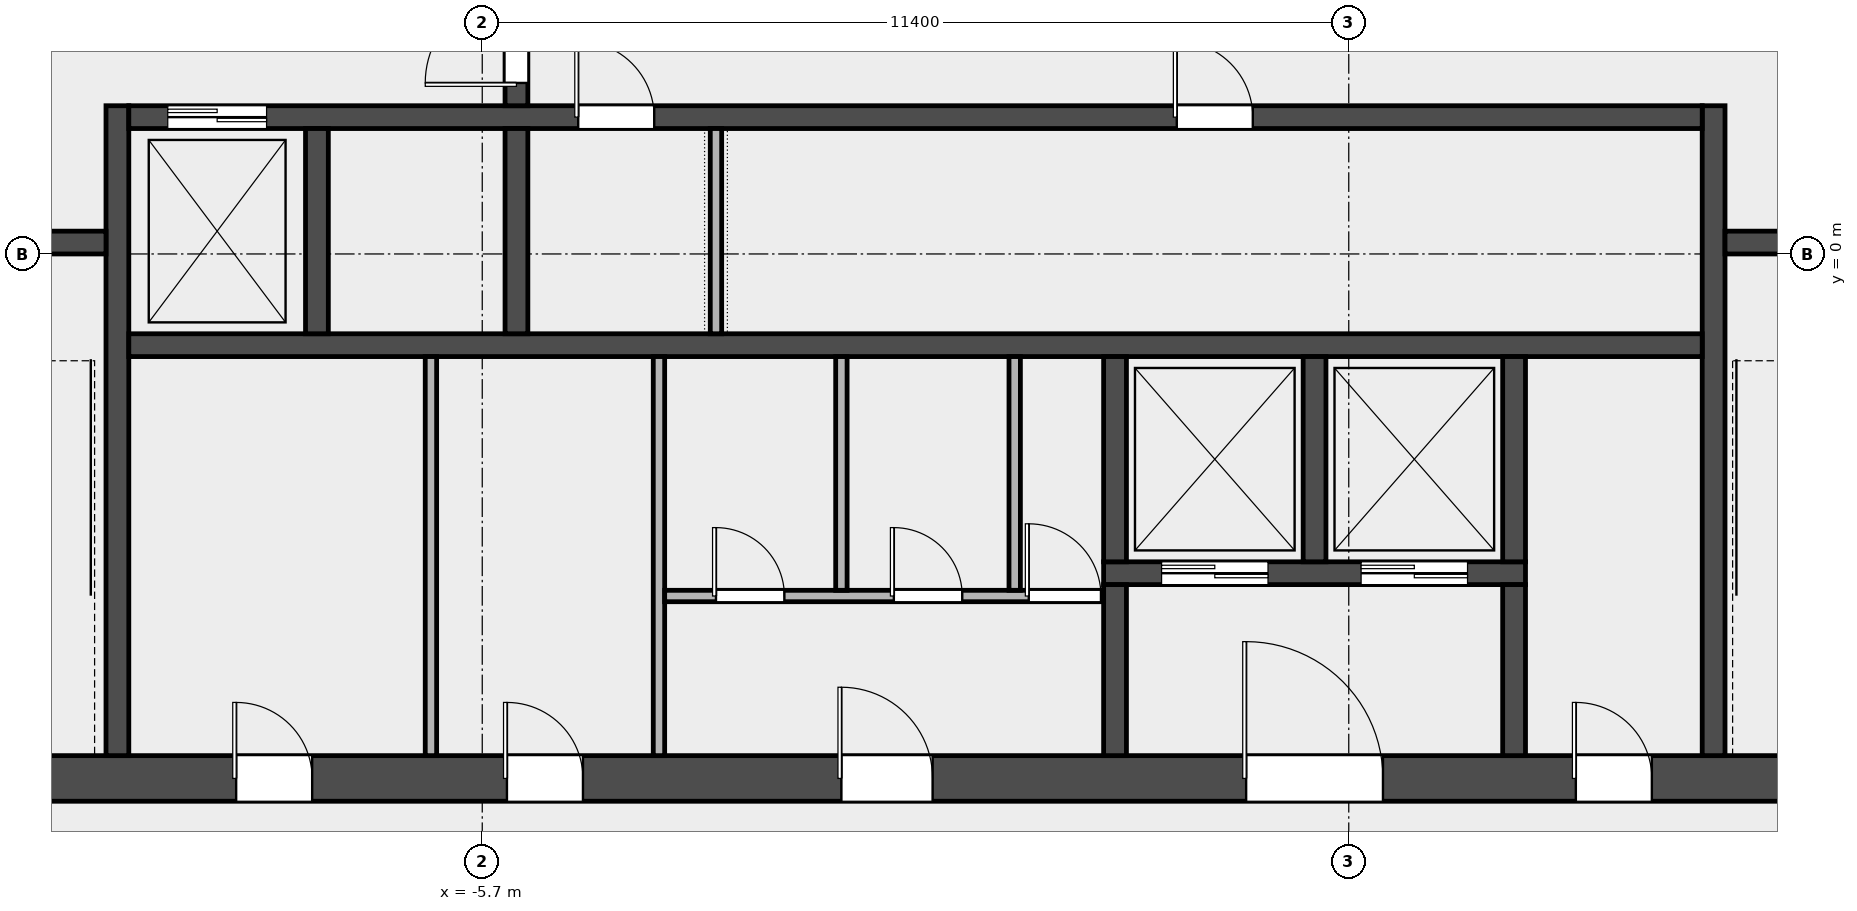
"""IFC4 building model, lengths in metres.
Left out: names, types, materials, properties, quantities, classifications, styles, units other than length and angle.
Written with IfcOpenShell. Run it as: python <this file> out.ifc"""

import sys

from ifc_helpers import new_model, si_unit, direction, frame, frame_2d, origin, place, context, subcontext, project, spatial, rectangle, extrude, element, fill, save


model = new_model("IFC4")
c1 = context("Model", 3, precision=1e-05, world=origin(), true_north=direction((0.0, 1.0)))
c2 = subcontext(c1, "Body", "Model", "MODEL_VIEW")
j1 = project(units=[si_unit("LENGTHUNIT", "METRE"), si_unit("PLANEANGLEUNIT", "RADIAN")], contexts=[c1])
p1 = place(None, origin())
s1 = spatial("IfcSite", under=j1, at=p1, CompositionType="ELEMENT")
p2 = place(p1, origin())
s2 = spatial("IfcBuilding", under=s1, at=p2, CompositionType="ELEMENT")
p3 = place(p2, frame((0.0, 0.0, 325.4)))
s3 = spatial("IfcBuildingStorey", under=s2, at=p3, CompositionType="ELEMENT", Elevation=325.4)
p4 = place(p3, frame((-14.4, -6.9, 0.0), z_axis=(0.0, 0.0, 1.0), x_axis=(1.0, 0.0, 0.0)))
e1 = element("IfcWall", 1, at=p4, inside=s3, PredefinedType="SHEAR", context=c2, shape_type="SweptSolid", body=[
    extrude(rectangle(XDim=28.8, YDim=0.6, at=frame_2d((14.4, 0.0))), origin(), (0.0, 0.0, 1.0), 3.7),
])
p5 = place(p4, frame((5.462, 0.0, 0.0)))
e2 = element("IfcOpeningElement", 2, at=p5, cuts=e1, PredefinedType="OPENING", context=c2, shape_type="SweptSolid", body=[
    extrude(rectangle(XDim=1.0, YDim=2.1, at=frame_2d((0.5, 1.05))), frame((0.0, 0.312, 0.0), z_axis=(0.0, -1.0, 0.0), x_axis=(1.0, 0.0, 0.0)), (0.0, 0.0, 1.0), 0.624),
])
p6 = place(p4, frame((9.025, 0.0, 0.0)))
e3 = element("IfcOpeningElement", 3, at=p6, cuts=e1, PredefinedType="OPENING", context=c2, shape_type="SweptSolid", body=[
    extrude(rectangle(XDim=1.0, YDim=2.1, at=frame_2d((0.5, 1.05))), frame((0.0, 0.312, 0.0), z_axis=(0.0, -1.0, 0.0), x_axis=(1.0, 0.0, 0.0)), (0.0, 0.0, 1.0), 0.624),
])
p7 = place(p4, frame((13.425, 0.0, 0.0)))
e4 = element("IfcOpeningElement", 4, at=p7, cuts=e1, PredefinedType="OPENING", context=c2, shape_type="SweptSolid", body=[
    extrude(rectangle(XDim=1.2, YDim=2.1, at=frame_2d((0.6, 1.05))), frame((0.0, 0.312, 0.0), z_axis=(0.0, -1.0, 0.0), x_axis=(1.0, 0.0, 0.0)), (0.0, 0.0, 1.0), 0.624),
])
p8 = place(p4, frame((18.75, 0.0, 0.0)))
e5 = element("IfcOpeningElement", 5, at=p8, cuts=e1, PredefinedType="OPENING", context=c2, shape_type="SweptSolid", body=[
    extrude(rectangle(XDim=1.8, YDim=2.1, at=frame_2d((0.9, 1.05))), frame((0.0, 0.312, 0.0), z_axis=(0.0, -1.0, 0.0), x_axis=(1.0, 0.0, 0.0)), (0.0, 0.0, 1.0), 0.624),
])
p9 = place(p4, frame((23.087, 0.0, 0.0)))
e6 = element("IfcOpeningElement", 6, at=p9, cuts=e1, PredefinedType="OPENING", context=c2, shape_type="SweptSolid", body=[
    extrude(rectangle(XDim=1.0, YDim=2.1, at=frame_2d((0.5, 1.05))), frame((0.0, 0.312, 0.0), z_axis=(0.0, -1.0, 0.0), x_axis=(1.0, 0.0, 0.0)), (0.0, 0.0, 1.0), 0.624),
])
for number, where, z_axis, x_axis in (
    (7, (-10.5, -6.6, 0.0), (0.0, 0.0, 1.0), (0.0, 1.0, 0.0)),
    (8, (10.5, -6.6, 0.0), (0.0, 0.0, 1.0), (0.0, 1.0, 0.0)),
):
    element("IfcWall", number, at=place(p3, frame(where, z_axis=z_axis, x_axis=x_axis)), inside=s3, PredefinedType="SHEAR", context=c2, shape_type="SweptSolid", body=[
        extrude(rectangle(XDim=8.55, YDim=0.3, at=frame_2d((4.275, 0.0))), origin(), (0.0, 0.0, 1.0), 3.7),
    ])
p10 = place(p3, frame((-13.8, 0.15, 0.0), z_axis=(0.0, 0.0, 1.0), x_axis=(1.0, 0.0, 0.0)))
e9 = element("IfcWall", 9, at=p10, inside=s3, PredefinedType="SOLIDWALL", context=c2, shape_type="SweptSolid", body=[
    extrude(rectangle(XDim=3.15, YDim=0.3, at=frame_2d((1.575, 0.0))), origin(), (0.0, 0.0, 1.0), 3.7),
])
p11 = place(p10, frame((0.975, 0.0, 0.0)))
e10 = element("IfcOpeningElement", 10, at=p11, cuts=e9, PredefinedType="OPENING", context=c2, shape_type="SweptSolid", body=[
    extrude(rectangle(XDim=1.1, YDim=2.1, at=frame_2d((0.55, 1.05))), frame((0.0, 0.162, 0.0), z_axis=(0.0, -1.0, 0.0), x_axis=(1.0, 0.0, 0.0)), (0.0, 0.0, 1.0), 0.324),
])
p12 = place(p3, frame((10.65, 0.15, 0.0), z_axis=(0.0, 0.0, 1.0), x_axis=(1.0, 0.0, 0.0)))
e11 = element("IfcWall", 11, at=p12, inside=s3, PredefinedType="SOLIDWALL", context=c2, shape_type="SweptSolid", body=[
    extrude(rectangle(XDim=3.15, YDim=0.3, at=frame_2d((1.575, 0.0))), origin(), (0.0, 0.0, 1.0), 3.7),
])
p13 = place(p12, frame((1.025, 0.0, 0.0)))
e12 = element("IfcOpeningElement", 12, at=p13, cuts=e11, PredefinedType="OPENING", context=c2, shape_type="SweptSolid", body=[
    extrude(rectangle(XDim=1.1, YDim=2.1, at=frame_2d((0.55, 1.05))), frame((0.0, 0.162, 0.0), z_axis=(0.0, -1.0, 0.0), x_axis=(1.0, 0.0, 0.0)), (0.0, 0.0, 1.0), 0.324),
])
p14 = place(p3, frame((-10.35, -1.2, 0.0), z_axis=(0.0, 0.0, 1.0), x_axis=(1.0, 0.0, 0.0)))
e13 = element("IfcWall", 13, at=p14, inside=s3, PredefinedType="SOLIDWALL", context=c2, shape_type="SweptSolid", body=[
    extrude(rectangle(XDim=20.7, YDim=0.3, at=frame_2d((10.35, 0.0))), origin(), (0.0, 0.0, 1.0), 3.7),
])
p15 = place(p3, frame((-10.35, 1.8, 0.0), z_axis=(0.0, 0.0, 1.0), x_axis=(1.0, 0.0, 0.0)))
e14 = element("IfcWall", 14, at=p15, inside=s3, PredefinedType="SOLIDWALL", context=c2, shape_type="SweptSolid", body=[
    extrude(rectangle(XDim=20.7, YDim=0.3, at=frame_2d((10.35, 0.0))), origin(), (0.0, 0.0, 1.0), 3.7),
])
p16 = place(p15, frame((0.512, 0.0, 0.0)))
e15 = element("IfcOpeningElement", 15, at=p16, cuts=e14, PredefinedType="OPENING", context=c2, shape_type="SweptSolid", body=[
    extrude(rectangle(XDim=1.3, YDim=2.1, at=frame_2d((0.65, 1.05))), frame((0.0, 0.162, 0.0), z_axis=(0.0, -1.0, 0.0), x_axis=(1.0, 0.0, 0.0)), (0.0, 0.0, 1.0), 0.324),
])
p17 = place(p15, frame((5.913, 0.0, 0.0)))
e16 = element("IfcOpeningElement", 16, at=p17, cuts=e14, PredefinedType="OPENING", context=c2, shape_type="SweptSolid", body=[
    extrude(rectangle(XDim=1.0, YDim=2.1, at=frame_2d((0.5, 1.05))), frame((0.0, 0.162, 0.0), z_axis=(0.0, -1.0, 0.0), x_axis=(1.0, 0.0, 0.0)), (0.0, 0.0, 1.0), 0.324),
])
p18 = place(p15, frame((13.788, 0.0, 0.0)))
e17 = element("IfcOpeningElement", 17, at=p18, cuts=e14, PredefinedType="OPENING", context=c2, shape_type="SweptSolid", body=[
    extrude(rectangle(XDim=1.0, YDim=2.1, at=frame_2d((0.5, 1.05))), frame((0.0, 0.162, 0.0), z_axis=(0.0, -1.0, 0.0), x_axis=(1.0, 0.0, 0.0)), (0.0, 0.0, 1.0), 0.324),
])
for number, where, z_axis, x_axis in (
    (18, (-7.875, -1.05, 0.0), (0.0, 0.0, 1.0), (0.0, 1.0, 0.0)),
    (19, (-5.25, -1.05, 0.0), (0.0, 0.0, 1.0), (0.0, 1.0, 0.0)),
):
    element("IfcWall", number, at=place(p3, frame(where, z_axis=z_axis, x_axis=x_axis)), inside=s3, PredefinedType="SOLIDWALL", context=c2, shape_type="SweptSolid", body=[
        extrude(rectangle(XDim=2.7, YDim=0.3, at=frame_2d((1.35, 0.0))), origin(), (0.0, 0.0, 1.0), 3.7),
    ])
p19 = place(p3, frame((-5.25, 1.95, 0.0), z_axis=(0.0, 0.0, 1.0), x_axis=(0.0, 1.0, 0.0)))
e20 = element("IfcWall", 20, at=p19, inside=s3, PredefinedType="SOLIDWALL", context=c2, shape_type="SweptSolid", body=[
    extrude(rectangle(XDim=3.3, YDim=0.3, at=frame_2d((1.65, 0.0))), origin(), (0.0, 0.0, 1.0), 3.7),
])
p20 = place(p19, frame((0.3, 0.0, 0.0)))
e21 = element("IfcOpeningElement", 21, at=p20, cuts=e20, PredefinedType="OPENING", context=c2, shape_type="SweptSolid", body=[
    extrude(rectangle(XDim=1.2, YDim=2.1, at=frame_2d((0.6, 1.05))), frame((0.0, 0.162, 0.0), z_axis=(0.0, -1.0, 0.0), x_axis=(1.0, 0.0, 0.0)), (0.0, 0.0, 1.0), 0.324),
])
p21 = place(p19, frame((1.8, 0.0, 0.0)))
e22 = element("IfcOpeningElement", 22, at=p21, cuts=e20, PredefinedType="OPENING", context=c2, shape_type="SweptSolid", body=[
    extrude(rectangle(XDim=1.2, YDim=2.1, at=frame_2d((0.6, 1.05))), frame((0.0, 0.162, 0.0), z_axis=(0.0, -1.0, 0.0), x_axis=(1.0, 0.0, 0.0)), (0.0, 0.0, 1.0), 0.324),
])
p22 = place(p3, frame((2.475, -4.2, 0.0), z_axis=(0.0, 0.0, 1.0), x_axis=(1.0, 0.0, 0.0)))
e23 = element("IfcWall", 23, at=p22, inside=s3, PredefinedType="SOLIDWALL", context=c2, shape_type="SweptSolid", body=[
    extrude(rectangle(XDim=5.55, YDim=0.3, at=frame_2d((2.775, 0.0))), origin(), (0.0, 0.0, 1.0), 3.7),
])
p23 = place(p22, frame((0.762, 0.0, 0.0)))
e24 = element("IfcOpeningElement", 24, at=p23, cuts=e23, PredefinedType="OPENING", context=c2, shape_type="SweptSolid", body=[
    extrude(rectangle(XDim=1.4, YDim=2.1, at=frame_2d((0.7, 1.05))), frame((0.0, 0.162, 0.0), z_axis=(0.0, -1.0, 0.0), x_axis=(1.0, 0.0, 0.0)), (0.0, 0.0, 1.0), 0.324),
])
p24 = place(p22, frame((3.387, 0.0, 0.0)))
e25 = element("IfcOpeningElement", 25, at=p24, cuts=e23, PredefinedType="OPENING", context=c2, shape_type="SweptSolid", body=[
    extrude(rectangle(XDim=1.4, YDim=2.1, at=frame_2d((0.7, 1.05))), frame((0.0, 0.162, 0.0), z_axis=(0.0, -1.0, 0.0), x_axis=(1.0, 0.0, 0.0)), (0.0, 0.0, 1.0), 0.324),
])
p25 = place(p3, frame((2.625, -4.05, 0.0), z_axis=(0.0, 0.0, 1.0), x_axis=(0.0, 1.0, 0.0)))
e26 = element("IfcWall", 26, at=p25, inside=s3, PredefinedType="SOLIDWALL", context=c2, shape_type="SweptSolid", body=[
    extrude(rectangle(XDim=2.7, YDim=0.3, at=frame_2d((1.35, 0.0))), origin(), (0.0, 0.0, 1.0), 3.7),
])
p26 = place(p3, frame((2.625, -6.6, 0.0), z_axis=(0.0, 0.0, 1.0), x_axis=(0.0, 1.0, 0.0)))
e27 = element("IfcWall", 27, at=p26, inside=s3, PredefinedType="SOLIDWALL", context=c2, shape_type="SweptSolid", body=[
    extrude(rectangle(XDim=2.25, YDim=0.3, at=frame_2d((1.125, 0.0))), origin(), (0.0, 0.0, 1.0), 3.7),
])
for number, where, z_axis, x_axis in (
    (28, (5.25, -4.05, 0.0), (0.0, 0.0, 1.0), (0.0, 1.0, 0.0)),
    (29, (7.875, -4.05, 0.0), (0.0, 0.0, 1.0), (0.0, 1.0, 0.0)),
):
    element("IfcWall", number, at=place(p3, frame(where, z_axis=z_axis, x_axis=x_axis)), inside=s3, PredefinedType="SOLIDWALL", context=c2, shape_type="SweptSolid", body=[
        extrude(rectangle(XDim=2.7, YDim=0.3, at=frame_2d((1.35, 0.0))), origin(), (0.0, 0.0, 1.0), 3.7),
    ])
p27 = place(p3, frame((7.875, -6.6, 0.0), z_axis=(0.0, 0.0, 1.0), x_axis=(0.0, 1.0, 0.0)))
e30 = element("IfcWall", 30, at=p27, inside=s3, PredefinedType="SOLIDWALL", context=c2, shape_type="SweptSolid", body=[
    extrude(rectangle(XDim=2.25, YDim=0.3, at=frame_2d((1.125, 0.0))), origin(), (0.0, 0.0, 1.0), 3.7),
])
for number, where, z_axis, x_axis in (
    (31, (-6.375, -6.6, 0.0), (0.0, 0.0, 1.0), (0.0, 1.0, 0.0)),
    (32, (-3.375, -6.6, 0.0), (0.0, 0.0, 1.0), (0.0, 1.0, 0.0)),
):
    element("IfcWall", number, at=place(p3, frame(where, z_axis=z_axis, x_axis=x_axis)), inside=s3, PredefinedType="PARTITIONING", context=c2, shape_type="SweptSolid", body=[
        extrude(rectangle(XDim=5.25, YDim=0.15, at=frame_2d((2.625, 0.0))), origin(), (0.0, 0.0, 1.0), 3.7),
    ])
p28 = place(p3, frame((-3.3, -4.5, 0.0), z_axis=(0.0, 0.0, 1.0), x_axis=(1.0, 0.0, 0.0)))
e33 = element("IfcWall", 33, at=p28, inside=s3, PredefinedType="PARTITIONING", context=c2, shape_type="SweptSolid", body=[
    extrude(rectangle(XDim=5.775, YDim=0.15, at=frame_2d((2.888, 0.0))), origin(), (0.0, 0.0, 1.0), 3.7),
])
p29 = place(p28, frame((0.675, 0.0, 0.0)))
e34 = element("IfcOpeningElement", 34, at=p29, cuts=e33, PredefinedType="OPENING", context=c2, shape_type="SweptSolid", body=[
    extrude(rectangle(XDim=0.9, YDim=2.1, at=frame_2d((0.45, 1.05))), frame((0.0, 0.087, 0.0), z_axis=(0.0, -1.0, 0.0), x_axis=(1.0, 0.0, 0.0)), (0.0, 0.0, 1.0), 0.174),
])
p30 = place(p28, frame((3.015, 0.0, 0.0)))
e35 = element("IfcOpeningElement", 35, at=p30, cuts=e33, PredefinedType="OPENING", context=c2, shape_type="SweptSolid", body=[
    extrude(rectangle(XDim=0.9, YDim=2.1, at=frame_2d((0.45, 1.05))), frame((0.0, 0.087, 0.0), z_axis=(0.0, -1.0, 0.0), x_axis=(1.0, 0.0, 0.0)), (0.0, 0.0, 1.0), 0.174),
])
p31 = place(p28, frame((4.79, 0.0, 0.0)))
e36 = element("IfcOpeningElement", 36, at=p31, cuts=e33, PredefinedType="OPENING", context=c2, shape_type="SweptSolid", body=[
    extrude(rectangle(XDim=0.95, YDim=2.1, at=frame_2d((0.475, 1.05))), frame((0.0, 0.087, 0.0), z_axis=(0.0, -1.0, 0.0), x_axis=(1.0, 0.0, 0.0)), (0.0, 0.0, 1.0), 0.174),
])
for number, where, z_axis, x_axis in (
    (37, (-0.975, -4.425, 0.0), (0.0, 0.0, 1.0), (0.0, 1.0, 0.0)),
    (38, (1.305, -4.425, 0.0), (0.0, 0.0, 1.0), (0.0, 1.0, 0.0)),
):
    element("IfcWall", number, at=place(p3, frame(where, z_axis=z_axis, x_axis=x_axis)), inside=s3, PredefinedType="PARTITIONING", context=c2, shape_type="SweptSolid", body=[
        extrude(rectangle(XDim=3.075, YDim=0.15, at=frame_2d((1.538, 0.0))), origin(), (0.0, 0.0, 1.0), 3.7),
    ])
p32 = place(p3, frame((-2.625, -1.05, 0.0), z_axis=(0.0, 0.0, 1.0), x_axis=(0.0, 1.0, 0.0)))
e39 = element("IfcWall", 39, at=p32, inside=s3, PredefinedType="PARTITIONING", context=c2, shape_type="SweptSolid", body=[
    extrude(rectangle(XDim=2.7, YDim=0.15, at=frame_2d((1.35, 0.0))), origin(), (0.0, 0.0, 1.0), 3.7),
])
p33 = place(p20, origin())
e40 = element("IfcDoor", 40, at=p33, inside=s3, OperationType="SINGLE_SWING_LEFT", PredefinedType="DOOR", context=c2, shape_type="SweptSolid", body=[
    extrude(rectangle(XDim=1.2, YDim=2.1, at=frame_2d((0.6, 1.05))), frame((0.0, 0.025, 0.0), z_axis=(0.0, -1.0, 0.0), x_axis=(1.0, 0.0, 0.0)), (0.0, 0.0, 1.0), 0.05),
])
fill(e21, e40)
p34 = place(p16, origin())
e41 = element("IfcDoor", 41, at=p34, inside=s3, OperationType="DOUBLE_DOOR_SLIDING", PredefinedType="DOOR", context=c2, shape_type="SweptSolid", body=[
    extrude(rectangle(XDim=1.3, YDim=2.1, at=frame_2d((0.65, 1.05))), frame((0.0, 0.025, 0.0), z_axis=(0.0, -1.0, 0.0), x_axis=(1.0, 0.0, 0.0)), (0.0, 0.0, 1.0), 0.05),
])
fill(e15, e41)
p35 = place(p23, origin())
e42 = element("IfcDoor", 42, at=p35, inside=s3, OperationType="DOUBLE_DOOR_SLIDING", PredefinedType="DOOR", context=c2, shape_type="SweptSolid", body=[
    extrude(rectangle(XDim=1.4, YDim=2.1, at=frame_2d((0.7, 1.05))), frame((0.0, 0.025, 0.0), z_axis=(0.0, -1.0, 0.0), x_axis=(1.0, 0.0, 0.0)), (0.0, 0.0, 1.0), 0.05),
])
fill(e24, e42)
p36 = place(p24, origin())
e43 = element("IfcDoor", 43, at=p36, inside=s3, OperationType="DOUBLE_DOOR_SLIDING", PredefinedType="DOOR", context=c2, shape_type="SweptSolid", body=[
    extrude(rectangle(XDim=1.4, YDim=2.1, at=frame_2d((0.7, 1.05))), frame((0.0, 0.025, 0.0), z_axis=(0.0, -1.0, 0.0), x_axis=(1.0, 0.0, 0.0)), (0.0, 0.0, 1.0), 0.05),
])
fill(e25, e43)
p37 = place(p5, origin())
e44 = element("IfcDoor", 44, at=p37, inside=s3, OperationType="SINGLE_SWING_LEFT", PredefinedType="DOOR", context=c2, shape_type="SweptSolid", body=[
    extrude(rectangle(XDim=1.0, YDim=2.1, at=frame_2d((0.5, 1.05))), frame((0.0, 0.025, 0.0), z_axis=(0.0, -1.0, 0.0), x_axis=(1.0, 0.0, 0.0)), (0.0, 0.0, 1.0), 0.05),
])
fill(e2, e44)
p38 = place(p6, origin())
e45 = element("IfcDoor", 45, at=p38, inside=s3, OperationType="SINGLE_SWING_LEFT", PredefinedType="DOOR", context=c2, shape_type="SweptSolid", body=[
    extrude(rectangle(XDim=1.0, YDim=2.1, at=frame_2d((0.5, 1.05))), frame((0.0, 0.025, 0.0), z_axis=(0.0, -1.0, 0.0), x_axis=(1.0, 0.0, 0.0)), (0.0, 0.0, 1.0), 0.05),
])
fill(e3, e45)
p39 = place(p7, origin())
e46 = element("IfcDoor", 46, at=p39, inside=s3, OperationType="SINGLE_SWING_LEFT", PredefinedType="DOOR", context=c2, shape_type="SweptSolid", body=[
    extrude(rectangle(XDim=1.2, YDim=2.1, at=frame_2d((0.6, 1.05))), frame((0.0, 0.025, 0.0), z_axis=(0.0, -1.0, 0.0), x_axis=(1.0, 0.0, 0.0)), (0.0, 0.0, 1.0), 0.05),
])
fill(e4, e46)
p40 = place(p29, origin())
e47 = element("IfcDoor", 47, at=p40, inside=s3, OperationType="SINGLE_SWING_LEFT", PredefinedType="DOOR", context=c2, shape_type="SweptSolid", body=[
    extrude(rectangle(XDim=0.9, YDim=2.1, at=frame_2d((0.45, 1.05))), frame((0.0, 0.025, 0.0), z_axis=(0.0, -1.0, 0.0), x_axis=(1.0, 0.0, 0.0)), (0.0, 0.0, 1.0), 0.05),
])
fill(e34, e47)
p41 = place(p30, origin())
e48 = element("IfcDoor", 48, at=p41, inside=s3, OperationType="SINGLE_SWING_LEFT", PredefinedType="DOOR", context=c2, shape_type="SweptSolid", body=[
    extrude(rectangle(XDim=0.9, YDim=2.1, at=frame_2d((0.45, 1.05))), frame((0.0, 0.025, 0.0), z_axis=(0.0, -1.0, 0.0), x_axis=(1.0, 0.0, 0.0)), (0.0, 0.0, 1.0), 0.05),
])
fill(e35, e48)
p42 = place(p31, origin())
e49 = element("IfcDoor", 49, at=p42, inside=s3, OperationType="SINGLE_SWING_LEFT", PredefinedType="DOOR", context=c2, shape_type="SweptSolid", body=[
    extrude(rectangle(XDim=0.95, YDim=2.1, at=frame_2d((0.475, 1.05))), frame((0.0, 0.025, 0.0), z_axis=(0.0, -1.0, 0.0), x_axis=(1.0, 0.0, 0.0)), (0.0, 0.0, 1.0), 0.05),
])
fill(e36, e49)
p43 = place(p8, origin())
e50 = element("IfcDoor", 50, at=p43, inside=s3, OperationType="DOUBLE_DOOR_SINGLE_SWING", PredefinedType="DOOR", context=c2, shape_type="SweptSolid", body=[
    extrude(rectangle(XDim=1.8, YDim=2.1, at=frame_2d((0.9, 1.05))), frame((0.0, 0.025, 0.0), z_axis=(0.0, -1.0, 0.0), x_axis=(1.0, 0.0, 0.0)), (0.0, 0.0, 1.0), 0.05),
])
fill(e5, e50)
p44 = place(p9, origin())
e51 = element("IfcDoor", 51, at=p44, inside=s3, OperationType="SINGLE_SWING_LEFT", PredefinedType="DOOR", context=c2, shape_type="SweptSolid", body=[
    extrude(rectangle(XDim=1.0, YDim=2.1, at=frame_2d((0.5, 1.05))), frame((0.0, 0.025, 0.0), z_axis=(0.0, -1.0, 0.0), x_axis=(1.0, 0.0, 0.0)), (0.0, 0.0, 1.0), 0.05),
])
fill(e6, e51)
p45 = place(p17, origin())
e52 = element("IfcDoor", 52, at=p45, inside=s3, OperationType="SINGLE_SWING_LEFT", PredefinedType="DOOR", context=c2, shape_type="SweptSolid", body=[
    extrude(rectangle(XDim=1.0, YDim=2.1, at=frame_2d((0.5, 1.05))), frame((0.0, 0.025, 0.0), z_axis=(0.0, -1.0, 0.0), x_axis=(1.0, 0.0, 0.0)), (0.0, 0.0, 1.0), 0.05),
])
fill(e16, e52)
p46 = place(p18, origin())
e53 = element("IfcDoor", 53, at=p46, inside=s3, OperationType="SINGLE_SWING_LEFT", PredefinedType="DOOR", context=c2, shape_type="SweptSolid", body=[
    extrude(rectangle(XDim=1.0, YDim=2.1, at=frame_2d((0.5, 1.05))), frame((0.0, 0.025, 0.0), z_axis=(0.0, -1.0, 0.0), x_axis=(1.0, 0.0, 0.0)), (0.0, 0.0, 1.0), 0.05),
])
fill(e17, e53)
save(model, sys.argv[1])
